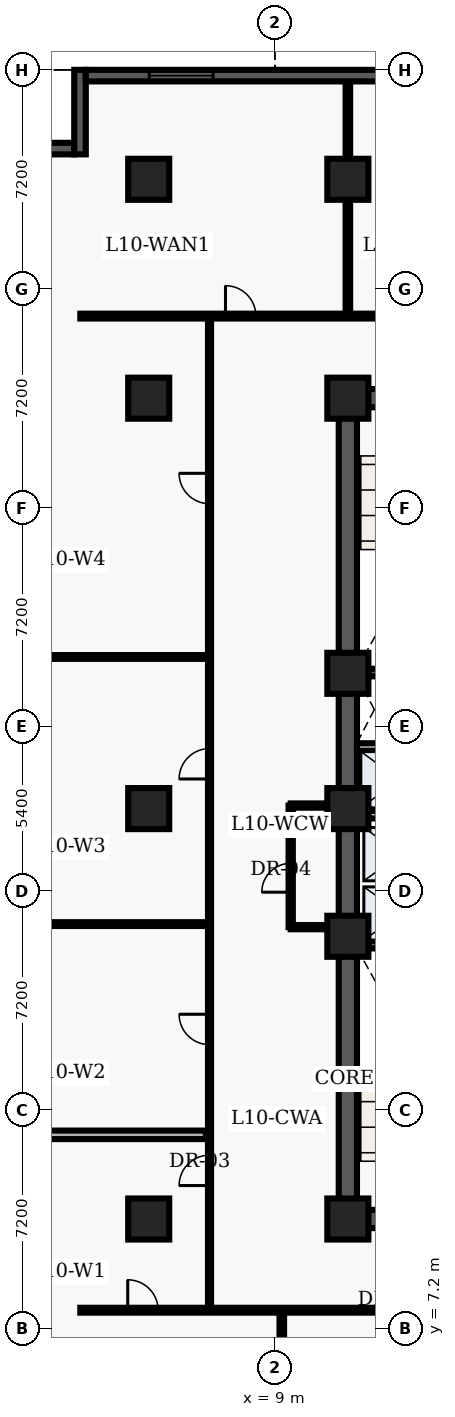
"""IFC4 building model, lengths in metres.
Left out: names, types, materials, properties, quantities, classifications, styles, units other than length and angle.
Written with IfcOpenShell. Run it as: python <this file> out.ifc"""

import sys

from ifc_helpers import new_model, entity, si_unit, converted_unit, direction, frame, origin_with_axes, origin_2d_with_axis, place, context, subcontext, project, spatial, polyline, rectangle, outline, extrude, element, fill, save


model = new_model("IFC4")
c1 = context("Model", 3, precision=1e-05, world=origin_with_axes(), true_north=direction((0.0, 1.0)))
c2 = subcontext(c1, "Body", "Model", "MODEL_VIEW")
j1 = project(units=[si_unit("LENGTHUNIT", "METRE"), converted_unit("PLANEANGLEUNIT", "DEGREE", entity("IfcPlaneAngleMeasure", 0.017), si_unit("PLANEANGLEUNIT", "RADIAN"), dimensions=[0, 0, 0, 0, 0, 0, 0])], contexts=[c1])
p1 = place(None, origin_with_axes())
s1 = spatial("IfcSite", under=j1, at=p1, CompositionType="ELEMENT")
p2 = place(p1, origin_with_axes())
s2 = spatial("IfcBuilding", under=s1, at=p2, CompositionType="ELEMENT")
p3 = place(p2, frame((0.0, 0.0, 44.4), z_axis=(0.0, 0.0, 1.0), x_axis=(1.0, 0.0, 0.0)))
s3 = spatial("IfcBuildingStorey", under=s2, at=p3, CompositionType="ELEMENT", Elevation=44.4)
p4 = place(p3, frame((11.4, 10.8, 0.0), z_axis=(0.0, 0.0, 1.0), x_axis=(0.0, 1.0, 0.0)))
e1 = element("IfcWall", 1, at=p4, inside=s3, PredefinedType="SHEAR", context=c2, shape_type="SweptSolid", body=[
    extrude(outline(polyline([(0.0, -0.3), (27.0, -0.3), (27.0, 0.3), (0.0, 0.3), (0.0, -0.3)])), origin_with_axes(), (0.0, 0.0, 1.0), 3.66),
])
p5 = place(p3, frame((11.4, 10.8, 0.0), z_axis=(0.0, 0.0, 1.0), x_axis=(1.0, 0.0, 0.0)))
e2 = element("IfcWall", 2, at=p5, inside=s3, PredefinedType="SHEAR", context=c2, shape_type="SweptSolid", body=[
    extrude(outline(polyline([(0.0, -0.3), (7.2, -0.3), (7.2, 0.3), (0.0, 0.3), (0.0, -0.3)])), origin_with_axes(), (0.0, 0.0, 1.0), 3.66),
])
p6 = place(p5, frame((2.625, 0.0, 0.0), z_axis=(0.0, 0.0, 1.0), x_axis=(1.0, 0.0, 0.0)))
e3 = element("IfcOpeningElement", 3, at=p6, cuts=e2, PredefinedType="OPENING", context=c2, shape_type="SweptSolid", body=[
    extrude(rectangle(XDim=1.05, YDim=0.62, at=origin_2d_with_axis()), origin_with_axes(), (0.0, 0.0, 1.0), 2.15),
])
p7 = place(p3, frame((11.4, 37.8, 0.0), z_axis=(0.0, 0.0, 1.0), x_axis=(1.0, 0.0, 0.0)))
e4 = element("IfcWall", 4, at=p7, inside=s3, PredefinedType="SHEAR", context=c2, shape_type="SweptSolid", body=[
    extrude(outline(polyline([(0.0, -0.3), (7.2, -0.3), (7.2, 0.3), (0.0, 0.3), (0.0, -0.3)])), origin_with_axes(), (0.0, 0.0, 1.0), 3.66),
])
p8 = place(p7, frame((2.625, 0.0, 0.0), z_axis=(0.0, 0.0, 1.0), x_axis=(1.0, 0.0, 0.0)))
e5 = element("IfcOpeningElement", 5, at=p8, cuts=e4, PredefinedType="OPENING", context=c2, shape_type="SweptSolid", body=[
    extrude(rectangle(XDim=1.05, YDim=0.62, at=origin_2d_with_axis()), origin_with_axes(), (0.0, 0.0, 1.0), 2.15),
])
for number, where, z_axis, x_axis in (
    (6, (11.7, 19.825, 0.0), (0.0, 0.0, 1.0), (1.0, 0.0, 0.0)),
    (7, (11.7, 28.775, 0.0), (0.0, 0.0, 1.0), (1.0, 0.0, 0.0)),
):
    element("IfcWall", number, at=place(p3, frame(where, z_axis=z_axis, x_axis=x_axis)), inside=s3, PredefinedType="SHEAR", context=c2, shape_type="SweptSolid", body=[
        extrude(outline(polyline([(0.0, -0.125), (6.6, -0.125), (6.6, 0.125), (0.0, 0.125), (0.0, -0.125)])), origin_with_axes(), (0.0, 0.0, 1.0), 3.66),
    ])
p9 = place(p3, frame((11.7, 24.1, 0.0), z_axis=(0.0, 0.0, 1.0), x_axis=(1.0, 0.0, 0.0)))
e8 = element("IfcWall", 8, at=p9, inside=s3, PredefinedType="SOLIDWALL", context=c2, shape_type="SweptSolid", body=[
    extrude(outline(polyline([(0.0, -0.125), (6.6, -0.125), (6.6, 0.125), (0.0, 0.125), (0.0, -0.125)])), origin_with_axes(), (0.0, 0.0, 1.0), 2.7),
])
p10 = place(p9, frame((3.6, 0.0, 0.0), z_axis=(0.0, 0.0, 1.0), x_axis=(1.0, 0.0, 0.0)))
e9 = element("IfcOpeningElement", 9, at=p10, cuts=e8, PredefinedType="OPENING", context=c2, shape_type="SweptSolid", body=[
    extrude(rectangle(XDim=0.9, YDim=0.27, at=origin_2d_with_axis()), origin_with_axes(), (0.0, 0.0, 1.0), 2.15),
])
p11 = place(p9, frame((5.65, 0.0, 0.0), z_axis=(0.0, 0.0, 1.0), x_axis=(1.0, 0.0, 0.0)))
e10 = element("IfcOpeningElement", 10, at=p11, cuts=e8, PredefinedType="OPENING", context=c2, shape_type="SweptSolid", body=[
    extrude(rectangle(XDim=0.9, YDim=0.27, at=origin_2d_with_axis()), origin_with_axes(), (0.0, 0.0, 1.0), 2.15),
])
p12 = place(p3, frame((11.7, 26.325, 0.0), z_axis=(0.0, 0.0, 1.0), x_axis=(1.0, 0.0, 0.0)))
e11 = element("IfcWall", 11, at=p12, inside=s3, PredefinedType="SOLIDWALL", context=c2, shape_type="SweptSolid", body=[
    extrude(outline(polyline([(0.0, -0.125), (6.6, -0.125), (6.6, 0.125), (0.0, 0.125), (0.0, -0.125)])), origin_with_axes(), (0.0, 0.0, 1.0), 2.7),
])
p13 = place(p12, frame((3.5, 0.0, 0.0), z_axis=(0.0, 0.0, 1.0), x_axis=(1.0, 0.0, 0.0)))
e12 = element("IfcOpeningElement", 12, at=p13, cuts=e11, PredefinedType="OPENING", context=c2, shape_type="SweptSolid", body=[
    extrude(rectangle(XDim=0.9, YDim=0.27, at=origin_2d_with_axis()), origin_with_axes(), (0.0, 0.0, 1.0), 2.15),
])
for number, where, z_axis, x_axis in (
    (13, (11.4, 10.8, 0.0), (0.0, 0.0, 1.0), (1.0, 0.0, 0.0)),
    (14, (11.4, 20.1, 0.0), (0.0, 0.0, 1.0), (1.0, 0.0, 0.0)),
    (15, (11.4, 24.3, 0.0), (0.0, 0.0, 1.0), (1.0, 0.0, 0.0)),
    (16, (11.4, 28.75, 0.0), (0.0, 0.0, 1.0), (1.0, 0.0, 0.0)),
    (17, (11.4, 37.8, 0.0), (0.0, 0.0, 1.0), (1.0, 0.0, 0.0)),
    (18, (11.4, 45.0, 0.0), (0.0, 0.0, 1.0), (1.0, 0.0, 0.0)),
    (19, (4.85, 10.8, 0.0), (0.0, 0.0, 1.0), (1.0, 0.0, 0.0)),
    (20, (4.85, 24.3, 0.0), (0.0, 0.0, 1.0), (1.0, 0.0, 0.0)),
    (21, (4.85, 37.8, 0.0), (0.0, 0.0, 1.0), (1.0, 0.0, 0.0)),
    (22, (4.85, 45.0, 0.0), (0.0, 0.0, 1.0), (1.0, 0.0, 0.0)),
):
    element("IfcColumn", number, at=place(p3, frame(where, z_axis=z_axis, x_axis=x_axis)), inside=s3, PredefinedType="COLUMN", context=c2, shape_type="SweptSolid", body=[
        extrude(rectangle(XDim=1.35, YDim=1.35, at=origin_2d_with_axis()), origin_with_axes(), (0.0, 0.0, 1.0), 3.9),
    ])
p14 = place(p3, frame((9.52, 20.4, 0.0), z_axis=(0.0, 0.0, 1.0), x_axis=(0.0, 1.0, 0.0)))
e23 = element("IfcWall", 23, at=p14, inside=s3, PredefinedType="PARTITIONING", context=c2, shape_type="SweptSolid", body=[
    extrude(outline(polyline([(0.0, -0.07), (4.0, -0.07), (4.0, 0.07), (0.0, 0.07), (0.0, -0.07)])), origin_with_axes(), (0.0, 0.0, 1.0), 2.7),
])
p15 = place(p14, frame((1.625, 0.0, 0.0), z_axis=(0.0, 0.0, 1.0), x_axis=(1.0, 0.0, 0.0)))
e24 = element("IfcOpeningElement", 24, at=p15, cuts=e23, PredefinedType="OPENING", context=c2, shape_type="SweptSolid", body=[
    extrude(rectangle(XDim=0.95, YDim=0.16, at=origin_2d_with_axis()), origin_with_axes(), (0.0, 0.0, 1.0), 2.15),
])
for number, where, z_axis, x_axis in (
    (25, (9.52, 20.4, 0.0), (0.0, 0.0, 1.0), (1.0, 0.0, 0.0)),
    (26, (9.52, 24.4, 0.0), (0.0, 0.0, 1.0), (1.0, 0.0, 0.0)),
):
    element("IfcWall", number, at=place(p3, frame(where, z_axis=z_axis, x_axis=x_axis)), inside=s3, PredefinedType="PARTITIONING", context=c2, shape_type="SweptSolid", body=[
        extrude(outline(polyline([(0.0, -0.07), (1.58, -0.07), (1.58, 0.07), (0.0, 0.07), (0.0, -0.07)])), origin_with_axes(), (0.0, 0.0, 1.0), 2.7),
    ])
p16 = place(p3, frame((2.6, 7.8, 0.0), z_axis=(0.0, 0.0, 1.0), x_axis=(1.0, 0.0, 0.0)))
e27 = element("IfcWall", 27, at=p16, inside=s3, PredefinedType="PARTITIONING", context=c2, shape_type="SweptSolid", body=[
    extrude(outline(polyline([(0.0, -0.08), (18.55, -0.08), (18.55, 0.08), (0.0, 0.08), (0.0, -0.08)])), origin_with_axes(), (0.0, 0.0, 1.0), 2.7),
])
p17 = place(p16, frame((2.059, 0.0, 0.0), z_axis=(0.0, 0.0, 1.0), x_axis=(1.0, 0.0, 0.0)))
e28 = element("IfcOpeningElement", 28, at=p17, cuts=e27, PredefinedType="OPENING", context=c2, shape_type="SweptSolid", body=[
    extrude(rectangle(XDim=1.0, YDim=0.18, at=origin_2d_with_axis()), origin_with_axes(), (0.0, 0.0, 1.0), 2.15),
])
p18 = place(p16, frame((10.516, 0.0, 0.0), z_axis=(0.0, 0.0, 1.0), x_axis=(1.0, 0.0, 0.0)))
e29 = element("IfcOpeningElement", 29, at=p18, cuts=e27, PredefinedType="OPENING", context=c2, shape_type="SweptSolid", body=[
    extrude(rectangle(XDim=1.2, YDim=0.18, at=origin_2d_with_axis()), origin_with_axes(), (0.0, 0.0, 1.0), 2.2),
])
p19 = place(p16, frame((16.453, 0.0, 0.0), z_axis=(0.0, 0.0, 1.0), x_axis=(1.0, 0.0, 0.0)))
e30 = element("IfcOpeningElement", 30, at=p19, cuts=e27, PredefinedType="OPENING", context=c2, shape_type="SweptSolid", body=[
    extrude(rectangle(XDim=1.0, YDim=0.18, at=origin_2d_with_axis()), origin_with_axes(), (0.0, 0.0, 1.0), 2.15),
])
p20 = place(p3, frame((2.6, 40.5, 0.0), z_axis=(0.0, 0.0, 1.0), x_axis=(1.0, 0.0, 0.0)))
e31 = element("IfcWall", 31, at=p20, inside=s3, PredefinedType="PARTITIONING", context=c2, shape_type="SweptSolid", body=[
    extrude(outline(polyline([(0.0, -0.08), (18.65, -0.08), (18.65, 0.08), (0.0, 0.08), (0.0, -0.08)])), origin_with_axes(), (0.0, 0.0, 1.0), 2.7),
])
p21 = place(p20, frame((5.275, 0.0, 0.0), z_axis=(0.0, 0.0, 1.0), x_axis=(1.0, 0.0, 0.0)))
e32 = element("IfcOpeningElement", 32, at=p21, cuts=e31, PredefinedType="OPENING", context=c2, shape_type="SweptSolid", body=[
    extrude(rectangle(XDim=1.0, YDim=0.18, at=origin_2d_with_axis()), origin_with_axes(), (0.0, 0.0, 1.0), 2.15),
])
p22 = place(p20, frame((12.61, 0.0, 0.0), z_axis=(0.0, 0.0, 1.0), x_axis=(1.0, 0.0, 0.0)))
e33 = element("IfcOpeningElement", 33, at=p22, cuts=e31, PredefinedType="OPENING", context=c2, shape_type="SweptSolid", body=[
    extrude(rectangle(XDim=1.2, YDim=0.18, at=origin_2d_with_axis()), origin_with_axes(), (0.0, 0.0, 1.0), 2.2),
])
p23 = place(p3, frame((6.85, 7.8, 0.0), z_axis=(0.0, 0.0, 1.0), x_axis=(0.0, 1.0, 0.0)))
e34 = element("IfcWall", 34, at=p23, inside=s3, PredefinedType="PARTITIONING", context=c2, shape_type="SweptSolid", body=[
    extrude(outline(polyline([(0.0, -0.05), (32.7, -0.05), (32.7, 0.05), (0.0, 0.05), (0.0, -0.05)])), origin_with_axes(), (0.0, 0.0, 1.0), 2.7),
])
p24 = place(p23, frame((4.6, 0.0, 0.0), z_axis=(0.0, 0.0, 1.0), x_axis=(1.0, 0.0, 0.0)))
e35 = element("IfcOpeningElement", 35, at=p24, cuts=e34, PredefinedType="OPENING", context=c2, shape_type="SweptSolid", body=[
    extrude(rectangle(XDim=1.0, YDim=0.12, at=origin_2d_with_axis()), origin_with_axes(), (0.0, 0.0, 1.0), 2.15),
])
p25 = place(p23, frame((9.235, 0.0, 0.0), z_axis=(0.0, 0.0, 1.0), x_axis=(1.0, 0.0, 0.0)))
e36 = element("IfcOpeningElement", 36, at=p25, cuts=e34, PredefinedType="OPENING", context=c2, shape_type="SweptSolid", body=[
    extrude(rectangle(XDim=1.0, YDim=0.12, at=origin_2d_with_axis()), origin_with_axes(), (0.0, 0.0, 1.0), 2.15),
])
p26 = place(p23, frame((17.974, 0.0, 0.0), z_axis=(0.0, 0.0, 1.0), x_axis=(1.0, 0.0, 0.0)))
e37 = element("IfcOpeningElement", 37, at=p26, cuts=e34, PredefinedType="OPENING", context=c2, shape_type="SweptSolid", body=[
    extrude(rectangle(XDim=1.0, YDim=0.12, at=origin_2d_with_axis()), origin_with_axes(), (0.0, 0.0, 1.0), 2.15),
])
p27 = place(p23, frame((27.029, 0.0, 0.0), z_axis=(0.0, 0.0, 1.0), x_axis=(1.0, 0.0, 0.0)))
e38 = element("IfcOpeningElement", 38, at=p27, cuts=e34, PredefinedType="OPENING", context=c2, shape_type="SweptSolid", body=[
    extrude(rectangle(XDim=1.0, YDim=0.12, at=origin_2d_with_axis()), origin_with_axes(), (0.0, 0.0, 1.0), 2.15),
])
p28 = place(p3, frame((0.375, 13.569, 0.0), z_axis=(0.0, 0.0, 1.0), x_axis=(1.0, 0.0, 0.0)))
e39 = element("IfcWall", 39, at=p28, inside=s3, PredefinedType="PARTITIONING", context=c2, shape_type="SweptSolid", body=[
    extrude(outline(polyline([(0.0, -0.14), (6.355, -0.14), (6.355, 0.14), (0.0, 0.14), (0.0, -0.14)])), origin_with_axes(), (0.0, 0.0, 1.0), 2.7),
])
for number, where, z_axis, x_axis in (
    (40, (0.375, 20.501, 0.0), (0.0, 0.0, 1.0), (1.0, 0.0, 0.0)),
    (41, (0.375, 29.287, 0.0), (0.0, 0.0, 1.0), (1.0, 0.0, 0.0)),
):
    element("IfcWall", number, at=place(p3, frame(where, z_axis=z_axis, x_axis=x_axis)), inside=s3, PredefinedType="PARTITIONING", context=c2, shape_type="SweptSolid", body=[
        extrude(outline(polyline([(0.0, -0.062), (6.355, -0.062), (6.355, 0.062), (0.0, 0.062), (0.0, -0.062)])), origin_with_axes(), (0.0, 0.0, 1.0), 2.7),
    ])
p29 = place(p3, frame((9.227, 0.36, 0.0), z_axis=(0.0, 0.0, 1.0), x_axis=(0.0, 1.0, 0.0)))
e42 = element("IfcWall", 42, at=p29, inside=s3, PredefinedType="PARTITIONING", context=c2, shape_type="SweptSolid", body=[
    extrude(outline(polyline([(0.0, -0.075), (7.34, -0.075), (7.34, 0.075), (0.0, 0.075), (0.0, -0.075)])), origin_with_axes(), (0.0, 0.0, 1.0), 2.7),
])
p30 = place(p3, frame((11.4, 40.6, 0.0), z_axis=(0.0, 0.0, 1.0), x_axis=(0.0, 1.0, 0.0)))
e43 = element("IfcWall", 43, at=p30, inside=s3, PredefinedType="PARTITIONING", context=c2, shape_type="SweptSolid", body=[
    extrude(outline(polyline([(0.0, -0.075), (7.64, -0.075), (7.64, 0.075), (0.0, 0.075), (0.0, -0.075)])), origin_with_axes(), (0.0, 0.0, 1.0), 2.7),
])
p31 = place(p3, frame((0.38, 46.01, 0.0), z_axis=(0.0, 0.0, 1.0), x_axis=(1.0, 0.0, 0.0)))
e44 = element("IfcWall", 44, at=p31, inside=s3, PredefinedType="SOLIDWALL", context=c2, shape_type="SweptSolid", body=[
    extrude(outline(polyline([(0.0, -0.19), (2.02, -0.19), (2.02, 0.19), (0.0, 0.19), (0.0, -0.19)])), origin_with_axes(), (0.0, 0.0, 1.0), 3.66),
])
p32 = place(p3, frame((2.59, 45.82, 0.0), z_axis=(0.0, 0.0, 1.0), x_axis=(0.0, 1.0, 0.0)))
e45 = element("IfcWall", 45, at=p32, inside=s3, PredefinedType="SOLIDWALL", context=c2, shape_type="SweptSolid", body=[
    extrude(outline(polyline([(0.0, -0.19), (2.78, -0.19), (2.78, 0.19), (0.0, 0.19), (0.0, -0.19)])), origin_with_axes(), (0.0, 0.0, 1.0), 3.66),
])
p33 = place(p3, frame((2.78, 48.41, 0.0), z_axis=(0.0, 0.0, 1.0), x_axis=(1.0, 0.0, 0.0)))
e46 = element("IfcWall", 46, at=p33, inside=s3, PredefinedType="SOLIDWALL", context=c2, shape_type="SweptSolid", body=[
    extrude(outline(polyline([(0.0, -0.19), (16.42, -0.19), (16.42, 0.19), (0.0, 0.19), (0.0, -0.19)])), origin_with_axes(), (0.0, 0.0, 1.0), 3.66),
])
p34 = place(p33, frame((3.137, 0.0, 0.45), z_axis=(0.0, 0.0, 1.0), x_axis=(1.0, 0.0, 0.0)))
e47 = element("IfcOpeningElement", 47, at=p34, cuts=e46, PredefinedType="OPENING", context=c2, shape_type="SweptSolid", body=[
    extrude(rectangle(XDim=2.1, YDim=0.4, at=origin_2d_with_axis()), origin_with_axes(), (0.0, 0.0, 1.0), 2.2),
])
p35 = place(p33, frame((13.283, 0.0, 0.45), z_axis=(0.0, 0.0, 1.0), x_axis=(1.0, 0.0, 0.0)))
e48 = element("IfcOpeningElement", 48, at=p35, cuts=e46, PredefinedType="OPENING", context=c2, shape_type="SweptSolid", body=[
    extrude(rectangle(XDim=2.1, YDim=0.4, at=origin_2d_with_axis()), origin_with_axes(), (0.0, 0.0, 1.0), 2.2),
])
p36 = place(p14, frame((1.625, 0.0, 0.0), z_axis=(0.0, 0.0, 1.0), x_axis=(1.0, 0.0, 0.0)))
e49 = element("IfcDoor", 49, at=p36, inside=s3, OperationType="SINGLE_SWING_LEFT", PredefinedType="DOOR", context=c2, shape_type="SweptSolid", body=[
    extrude(rectangle(XDim=0.95, YDim=0.084, at=origin_2d_with_axis()), origin_with_axes(), (0.0, 0.0, 1.0), 2.15),
])
fill(e24, e49)
p37 = place(p23, frame((4.6, 0.0, 0.0), z_axis=(0.0, 0.0, 1.0), x_axis=(1.0, 0.0, 0.0)))
e50 = element("IfcDoor", 50, at=p37, inside=s3, OperationType="SINGLE_SWING_LEFT", PredefinedType="DOOR", context=c2, shape_type="SweptSolid", body=[
    extrude(rectangle(XDim=1.0, YDim=0.06, at=origin_2d_with_axis()), origin_with_axes(), (0.0, 0.0, 1.0), 2.15),
])
fill(e35, e50)
p38 = place(p23, frame((9.235, 0.0, 0.0), z_axis=(0.0, 0.0, 1.0), x_axis=(1.0, 0.0, 0.0)))
e51 = element("IfcDoor", 51, at=p38, inside=s3, OperationType="SINGLE_SWING_RIGHT", PredefinedType="DOOR", context=c2, shape_type="SweptSolid", body=[
    extrude(rectangle(XDim=1.0, YDim=0.06, at=origin_2d_with_axis()), origin_with_axes(), (0.0, 0.0, 1.0), 2.15),
])
fill(e36, e51)
p39 = place(p23, frame((17.974, 0.0, 0.0), z_axis=(0.0, 0.0, 1.0), x_axis=(1.0, 0.0, 0.0)))
e52 = element("IfcDoor", 52, at=p39, inside=s3, OperationType="SINGLE_SWING_LEFT", PredefinedType="DOOR", context=c2, shape_type="SweptSolid", body=[
    extrude(rectangle(XDim=1.0, YDim=0.06, at=origin_2d_with_axis()), origin_with_axes(), (0.0, 0.0, 1.0), 2.15),
])
fill(e37, e52)
p40 = place(p23, frame((27.029, 0.0, 0.0), z_axis=(0.0, 0.0, 1.0), x_axis=(1.0, 0.0, 0.0)))
e53 = element("IfcDoor", 53, at=p40, inside=s3, OperationType="SINGLE_SWING_RIGHT", PredefinedType="DOOR", context=c2, shape_type="SweptSolid", body=[
    extrude(rectangle(XDim=1.0, YDim=0.06, at=origin_2d_with_axis()), origin_with_axes(), (0.0, 0.0, 1.0), 2.15),
])
fill(e38, e53)
p41 = place(p16, frame((2.059, 0.0, 0.0), z_axis=(0.0, 0.0, 1.0), x_axis=(1.0, 0.0, 0.0)))
e54 = element("IfcDoor", 54, at=p41, inside=s3, OperationType="SINGLE_SWING_LEFT", PredefinedType="DOOR", context=c2, shape_type="SweptSolid", body=[
    extrude(rectangle(XDim=1.0, YDim=0.09, at=origin_2d_with_axis()), origin_with_axes(), (0.0, 0.0, 1.0), 2.15),
])
fill(e28, e54)
p42 = place(p20, frame((5.275, 0.0, 0.0), z_axis=(0.0, 0.0, 1.0), x_axis=(1.0, 0.0, 0.0)))
e55 = element("IfcDoor", 55, at=p42, inside=s3, OperationType="SINGLE_SWING_LEFT", PredefinedType="DOOR", context=c2, shape_type="SweptSolid", body=[
    extrude(rectangle(XDim=1.0, YDim=0.09, at=origin_2d_with_axis()), origin_with_axes(), (0.0, 0.0, 1.0), 2.15),
])
fill(e32, e55)
p43 = place(p33, frame((3.137, 0.0, 0.45), z_axis=(0.0, 0.0, 1.0), x_axis=(1.0, 0.0, 0.0)))
e56 = element("IfcWindow", 56, at=p43, inside=s3, PredefinedType="WINDOW", context=c2, shape_type="SweptSolid", body=[
    extrude(rectangle(XDim=2.1, YDim=0.09, at=origin_2d_with_axis()), origin_with_axes(), (0.0, 0.0, 1.0), 2.2),
])
fill(e47, e56)
save(model, sys.argv[1])
